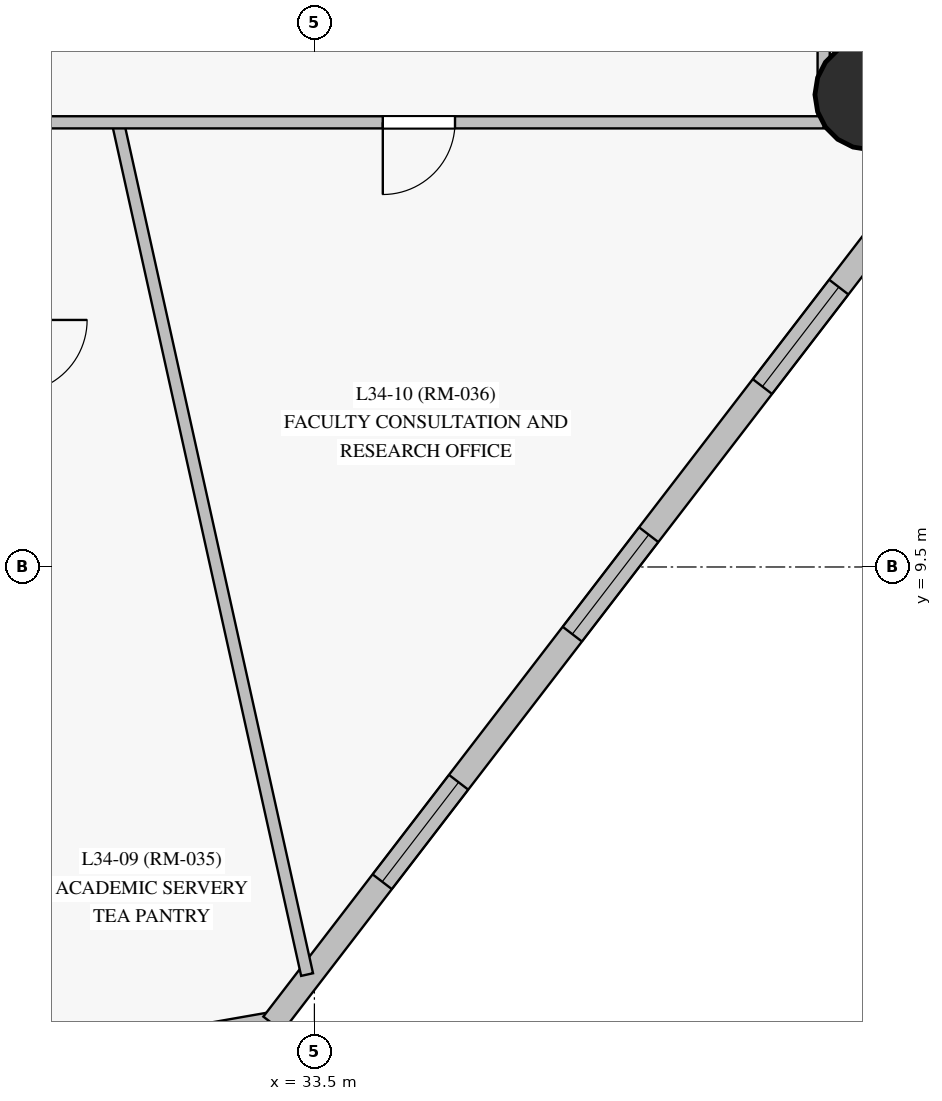
"""IFC4 building model, lengths in metres.
Left out: names, types, materials, properties, quantities, classifications, styles, units other than length and angle.
Written with IfcOpenShell. Run it as: python <this file> out.ifc"""

import sys

from ifc_helpers import new_model, si_unit, direction, frame, frame_2d, origin, origin_with_axes, origin_2d, place, context, subcontext, project, spatial, rectangle, circle, extrude, source, transform, mapped, element, fill, save


model = new_model("IFC4")
c1 = context("Model", 3, precision=1e-05, world=origin(), true_north=direction((0.0, 1.0)))
c2 = subcontext(c1, "Body", "Model", "MODEL_VIEW")
j1 = project(units=[si_unit("LENGTHUNIT", "METRE"), si_unit("PLANEANGLEUNIT", "RADIAN")], contexts=[c1])
p1 = place(None, origin())
s1 = spatial("IfcSite", under=j1, at=p1, CompositionType="ELEMENT")
p2 = place(p1, origin())
s2 = spatial("IfcBuilding", under=s1, at=p2, CompositionType="ELEMENT")
p3 = place(p2, frame((0.0, 0.0, 123.65)))
s3 = spatial("IfcBuildingStorey", under=s2, at=p3, CompositionType="ELEMENT", Elevation=123.65)
m1 = source(origin_with_axes(), c2, "Body", "SweptSolid", [
    extrude(circle(Radius=0.725, at=origin_2d()), origin(), (0.0, 0.0, 1.0), 3.05),
])
p4 = place(p3, frame((40.81, 15.714, 0.0), z_axis=(0.0, 0.0, 1.0), x_axis=(1.0, 0.0, 0.0)))
e1 = element("IfcColumn", 1, at=p4, inside=s3, PredefinedType="COLUMN", context=c2, shape_type="MappedRepresentation", body=[
    mapped(m1, transform((0.0, 0.0, 0.0), scale=1.0)),
])
p5 = place(p3, frame((23.58, 1.85, 0.0), z_axis=(0.0, 0.0, 1.0), x_axis=(0.985090629545, 0.172036192654, 0.0)))
e2 = element("IfcWall", 2, at=p5, inside=s3, PredefinedType="SOLIDWALL", context=c2, shape_type="SweptSolid", body=[
    extrude(rectangle(XDim=9.517, YDim=0.32, at=frame_2d((4.758, 0.0))), origin(), (0.0, 0.0, 1.0), 2.825),
])
p6 = place(p5, frame((0.515, 0.0, 0.85)))
e3 = element("IfcOpeningElement", 3, at=p6, cuts=e2, PredefinedType="OPENING", context=c2, shape_type="SweptSolid", body=[
    extrude(rectangle(XDim=0.95, YDim=1.5, at=frame_2d((0.475, 0.75))), frame((0.0, 0.17, 0.0), z_axis=(0.0, -1.0, 0.0), x_axis=(1.0, 0.0, 0.0)), (0.0, 0.0, 1.0), 0.34),
])
p7 = place(p5, frame((3.199, 0.0, 0.85)))
e4 = element("IfcOpeningElement", 4, at=p7, cuts=e2, PredefinedType="OPENING", context=c2, shape_type="SweptSolid", body=[
    extrude(rectangle(XDim=1.65, YDim=1.65, at=frame_2d((0.825, 0.825))), frame((0.0, 0.17, 0.0), z_axis=(0.0, -1.0, 0.0), x_axis=(1.0, 0.0, 0.0)), (0.0, 0.0, 1.0), 0.34),
])
p8 = place(p5, frame((6.968, 0.0, 0.85)))
e5 = element("IfcOpeningElement", 5, at=p8, cuts=e2, PredefinedType="OPENING", context=c2, shape_type="SweptSolid", body=[
    extrude(rectangle(XDim=1.65, YDim=1.65, at=frame_2d((0.825, 0.825))), frame((0.0, 0.17, 0.0), z_axis=(0.0, -1.0, 0.0), x_axis=(1.0, 0.0, 0.0)), (0.0, 0.0, 1.0), 0.34),
])
p9 = place(p3, frame((32.955, 3.487, 0.0), z_axis=(0.0, 0.0, 1.0), x_axis=(0.608995925668, 0.793173349603, 0.0)))
e6 = element("IfcWall", 6, at=p9, inside=s3, PredefinedType="SOLIDWALL", context=c2, shape_type="SweptSolid", body=[
    extrude(rectangle(XDim=14.199, YDim=0.32, at=frame_2d((7.1, 0.0))), origin(), (0.0, 0.0, 1.0), 2.825),
])
p10 = place(p9, frame((2.36, 0.0, 0.85)))
e7 = element("IfcOpeningElement", 7, at=p10, cuts=e6, PredefinedType="OPENING", context=c2, shape_type="SweptSolid", body=[
    extrude(rectangle(XDim=1.65, YDim=1.65, at=frame_2d((0.825, 0.825))), frame((0.0, 0.17, 0.0), z_axis=(0.0, -1.0, 0.0), x_axis=(1.0, 0.0, 0.0)), (0.0, 0.0, 1.0), 0.34),
])
p11 = place(p9, frame((6.467, 0.0, 0.85)))
e8 = element("IfcOpeningElement", 8, at=p11, cuts=e6, PredefinedType="OPENING", context=c2, shape_type="SweptSolid", body=[
    extrude(rectangle(XDim=1.65, YDim=1.65, at=frame_2d((0.825, 0.825))), frame((0.0, 0.17, 0.0), z_axis=(0.0, -1.0, 0.0), x_axis=(1.0, 0.0, 0.0)), (0.0, 0.0, 1.0), 0.34),
])
p12 = place(p9, frame((10.573, 0.0, 0.85)))
e9 = element("IfcOpeningElement", 9, at=p12, cuts=e6, PredefinedType="OPENING", context=c2, shape_type="SweptSolid", body=[
    extrude(rectangle(XDim=1.65, YDim=1.65, at=frame_2d((0.825, 0.825))), frame((0.0, 0.17, 0.0), z_axis=(0.0, -1.0, 0.0), x_axis=(1.0, 0.0, 0.0)), (0.0, 0.0, 1.0), 0.34),
])
p13 = place(p3, frame((40.2, 37.65, 0.0), z_axis=(0.0, 0.0, 1.0), x_axis=(0.0, -1.0, 0.0)))
e10 = element("IfcWall", 10, at=p13, inside=s3, PredefinedType="PARTITIONING", context=c2, shape_type="SweptSolid", body=[
    extrude(rectangle(XDim=22.3, YDim=0.16, at=frame_2d((11.15, 0.0))), origin(), (0.0, 0.0, 1.0), 2.325),
])
p14 = place(p13, frame((14.02, 0.0, 0.0)))
e11 = element("IfcOpeningElement", 11, at=p14, cuts=e10, PredefinedType="OPENING", context=c2, shape_type="SweptSolid", body=[
    extrude(rectangle(XDim=0.96, YDim=2.15, at=frame_2d((0.48, 1.075))), frame((0.0, 0.09, 0.0), z_axis=(0.0, -1.0, 0.0), x_axis=(1.0, 0.0, 0.0)), (0.0, 0.0, 1.0), 0.18),
])
p15 = place(p13, frame((10.675, 0.0, 0.0)))
e12 = element("IfcOpeningElement", 12, at=p15, cuts=e10, PredefinedType="OPENING", context=c2, shape_type="SweptSolid", body=[
    extrude(rectangle(XDim=0.96, YDim=2.15, at=frame_2d((0.48, 1.075))), frame((0.0, 0.09, 0.0), z_axis=(0.0, -1.0, 0.0), x_axis=(1.0, 0.0, 0.0)), (0.0, 0.0, 1.0), 0.18),
])
p16 = place(p13, frame((7.33, 0.0, 0.0)))
e13 = element("IfcOpeningElement", 13, at=p16, cuts=e10, PredefinedType="OPENING", context=c2, shape_type="SweptSolid", body=[
    extrude(rectangle(XDim=0.95, YDim=2.15, at=frame_2d((0.475, 1.075))), frame((0.0, 0.09, 0.0), z_axis=(0.0, -1.0, 0.0), x_axis=(1.0, 0.0, 0.0)), (0.0, 0.0, 1.0), 0.18),
])
p17 = place(p13, frame((4.91, 0.0, 0.0)))
e14 = element("IfcOpeningElement", 14, at=p17, cuts=e10, PredefinedType="OPENING", context=c2, shape_type="SweptSolid", body=[
    extrude(rectangle(XDim=0.95, YDim=2.15, at=frame_2d((0.475, 1.075))), frame((0.0, 0.09, 0.0), z_axis=(0.0, -1.0, 0.0), x_axis=(1.0, 0.0, 0.0)), (0.0, 0.0, 1.0), 0.18),
])
p18 = place(p3, frame((30.908, 15.379, 0.0), z_axis=(0.0, 0.0, 1.0), x_axis=(0.216759848163, -0.976224957796, 0.0)))
e15 = element("IfcWall", 15, at=p18, inside=s3, PredefinedType="PARTITIONING", context=c2, shape_type="SweptSolid", body=[
    extrude(rectangle(XDim=11.515, YDim=0.16, at=frame_2d((5.758, 0.0))), origin(), (0.0, 0.0, 1.0), 2.825),
])
p19 = place(p3, frame((40.2, 15.35, 0.0), z_axis=(0.0, 0.0, 1.0), x_axis=(-1.0, 0.0, 0.0)))
e16 = element("IfcWall", 16, at=p19, inside=s3, PredefinedType="PARTITIONING", context=c2, shape_type="SweptSolid", body=[
    extrude(rectangle(XDim=10.65, YDim=0.16, at=frame_2d((5.325, 0.0))), origin(), (0.0, 0.0, 1.0), 2.225),
])
p20 = place(p19, frame((4.85, 0.0, 0.0)))
e17 = element("IfcOpeningElement", 17, at=p20, cuts=e16, PredefinedType="OPENING", context=c2, shape_type="SweptSolid", body=[
    extrude(rectangle(XDim=0.95, YDim=2.15, at=frame_2d((0.475, 1.075))), frame((0.0, 0.09, 0.0), z_axis=(0.0, -1.0, 0.0), x_axis=(1.0, 0.0, 0.0)), (0.0, 0.0, 1.0), 0.18),
])
m2 = source(origin_with_axes(), c2, "Body", "SweptSolid", [
    extrude(rectangle(XDim=1.65, YDim=1.65, at=frame_2d((0.825, 0.825))), frame((0.0, 0.03, 0.0), z_axis=(0.0, -1.0, 0.0), x_axis=(1.0, 0.0, 0.0)), (0.0, 0.0, 1.0), 0.06),
])
p21 = place(p10, origin())
e18 = element("IfcWindow", 18, at=p21, inside=s3, PartitioningType="SINGLE_PANEL", PredefinedType="WINDOW", context=c2, shape_type="MappedRepresentation", body=[
    mapped(m2, transform((0.0, 0.0, 0.0), scale=1.0)),
])
fill(e7, e18)
p22 = place(p11, origin())
e19 = element("IfcWindow", 19, at=p22, inside=s3, PartitioningType="SINGLE_PANEL", PredefinedType="WINDOW", context=c2, shape_type="MappedRepresentation", body=[
    mapped(m2, transform((0.0, 0.0, 0.0), scale=1.0)),
])
fill(e8, e19)
p23 = place(p12, origin())
e20 = element("IfcWindow", 20, at=p23, inside=s3, PartitioningType="SINGLE_PANEL", PredefinedType="WINDOW", context=c2, shape_type="MappedRepresentation", body=[
    mapped(m2, transform((0.0, 0.0, 0.0), scale=1.0)),
])
fill(e9, e20)
m3 = source(origin_with_axes(), c2, "Body", "SweptSolid", [
    extrude(rectangle(XDim=0.95, YDim=2.15, at=frame_2d((0.475, 1.075))), frame((0.0, 0.025, 0.0), z_axis=(0.0, -1.0, 0.0), x_axis=(1.0, 0.0, 0.0)), (0.0, 0.0, 1.0), 0.05),
])
p24 = place(p20, origin())
e21 = element("IfcDoor", 21, at=p24, inside=s3, OperationType="SINGLE_SWING_RIGHT", PredefinedType="DOOR", context=c2, shape_type="MappedRepresentation", body=[
    mapped(m3, transform((0.0, 0.0, 0.0), scale=1.0)),
])
fill(e17, e21)
save(model, sys.argv[1])
